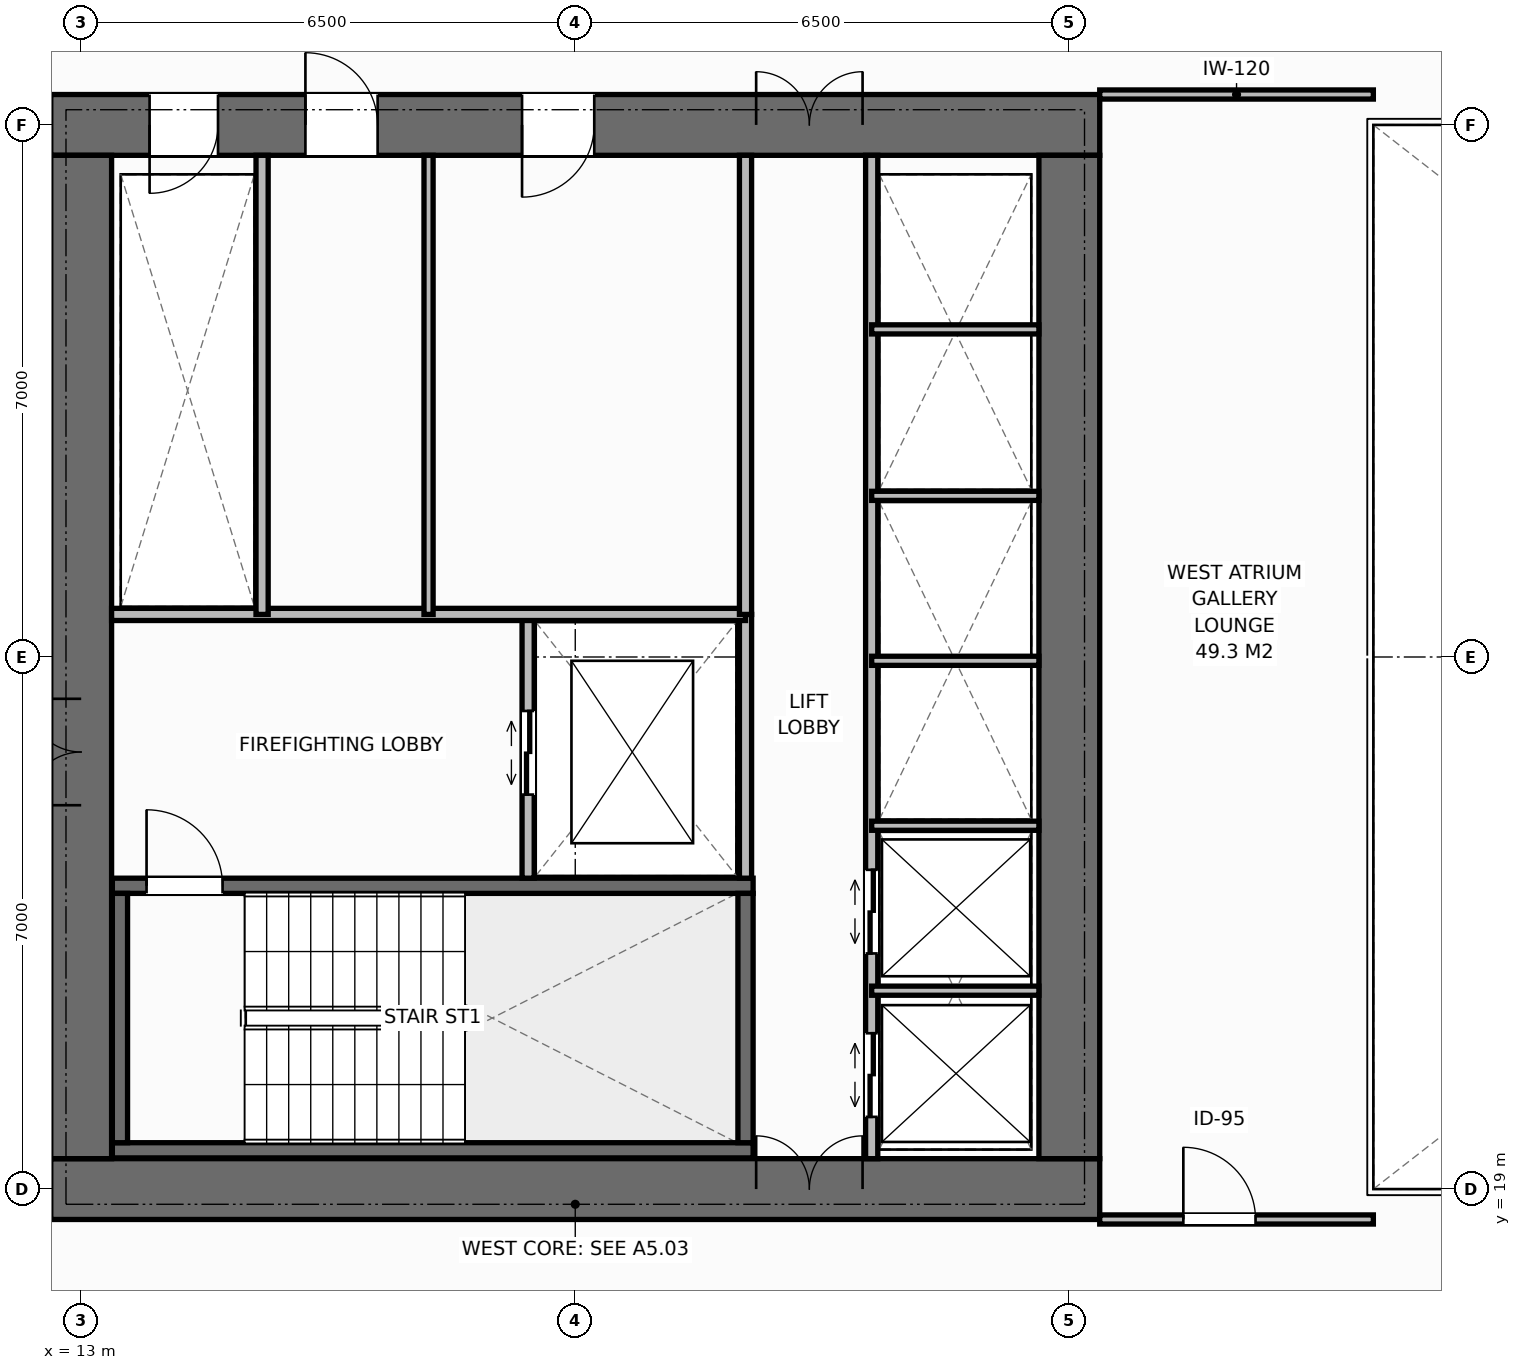
"""IFC4 building model, lengths in metres.
Left out: names, types, materials, properties, quantities, classifications, styles, units other than length and angle.
Written with IfcOpenShell. Run it as: python <this file> out.ifc"""

import sys

from ifc_helpers import new_model, si_unit, direction, frame, frame_2d, origin, place, context, subcontext, project, spatial, rectangle, extrude, element, fill, save


model = new_model("IFC4")
c1 = context("Model", 3, precision=1e-05, world=origin(), true_north=direction((0.0, 1.0)))
c2 = subcontext(c1, "Body", "Model", "MODEL_VIEW")
j1 = project(units=[si_unit("LENGTHUNIT", "METRE"), si_unit("PLANEANGLEUNIT", "RADIAN")], contexts=[c1])
p1 = place(None, origin())
s1 = spatial("IfcSite", under=j1, at=p1, CompositionType="ELEMENT")
p2 = place(p1, origin())
s2 = spatial("IfcBuilding", under=s1, at=p2, CompositionType="ELEMENT")
p3 = place(p2, frame((0.0, 0.0, 27.8)))
s3 = spatial("IfcBuildingStorey", under=s2, at=p3, CompositionType="ELEMENT", Elevation=27.8)
p4 = place(p3, frame((12.6, 19.0, 0.0), z_axis=(0.0, 0.0, 1.0), x_axis=(1.0, 0.0, 0.0)))
e1 = element("IfcWall", 1, at=p4, inside=s3, PredefinedType="SHEAR", context=c2, shape_type="SweptSolid", body=[
    extrude(rectangle(XDim=13.8, YDim=0.8, at=frame_2d((6.9, 0.0))), origin(), (0.0, 0.0, 1.0), 3.8),
])
p5 = place(p4, frame((9.28, 0.0, 0.0)))
e2 = element("IfcOpeningElement", 2, at=p5, cuts=e1, PredefinedType="OPENING", context=c2, shape_type="SweptSolid", body=[
    extrude(rectangle(XDim=1.4, YDim=2.2, at=frame_2d((0.7, 1.1))), frame((0.0, 0.41, 0.0), z_axis=(0.0, -1.0, 0.0), x_axis=(1.0, 0.0, 0.0)), (0.0, 0.0, 1.0), 0.82),
])
p6 = place(p3, frame((12.6, 33.0, 0.0), z_axis=(0.0, 0.0, 1.0), x_axis=(1.0, 0.0, 0.0)))
e3 = element("IfcWall", 3, at=p6, inside=s3, PredefinedType="SHEAR", context=c2, shape_type="SweptSolid", body=[
    extrude(rectangle(XDim=13.8, YDim=0.8, at=frame_2d((6.9, 0.0))), origin(), (0.0, 0.0, 1.0), 3.8),
])
p7 = place(p6, frame((1.3, 0.0, 0.0)))
e4 = element("IfcOpeningElement", 4, at=p7, cuts=e3, PredefinedType="OPENING", context=c2, shape_type="SweptSolid", body=[
    extrude(rectangle(XDim=0.9, YDim=2.15, at=frame_2d((0.45, 1.075))), frame((0.0, 0.41, 0.0), z_axis=(0.0, -1.0, 0.0), x_axis=(1.0, 0.0, 0.0)), (0.0, 0.0, 1.0), 0.82),
])
p8 = place(p6, frame((3.35, 0.0, 0.0)))
e5 = element("IfcOpeningElement", 5, at=p8, cuts=e3, PredefinedType="OPENING", context=c2, shape_type="SweptSolid", body=[
    extrude(rectangle(XDim=0.95, YDim=2.15, at=frame_2d((0.475, 1.075))), frame((0.0, 0.41, 0.0), z_axis=(0.0, -1.0, 0.0), x_axis=(1.0, 0.0, 0.0)), (0.0, 0.0, 1.0), 0.82),
])
p9 = place(p6, frame((6.2, 0.0, 0.0)))
e6 = element("IfcOpeningElement", 6, at=p9, cuts=e3, PredefinedType="OPENING", context=c2, shape_type="SweptSolid", body=[
    extrude(rectangle(XDim=0.95, YDim=2.15, at=frame_2d((0.475, 1.075))), frame((0.0, 0.41, 0.0), z_axis=(0.0, -1.0, 0.0), x_axis=(1.0, 0.0, 0.0)), (0.0, 0.0, 1.0), 0.82),
])
p10 = place(p6, frame((9.28, 0.0, 0.0)))
e7 = element("IfcOpeningElement", 7, at=p10, cuts=e3, PredefinedType="OPENING", context=c2, shape_type="SweptSolid", body=[
    extrude(rectangle(XDim=1.4, YDim=2.2, at=frame_2d((0.7, 1.1))), frame((0.0, 0.41, 0.0), z_axis=(0.0, -1.0, 0.0), x_axis=(1.0, 0.0, 0.0)), (0.0, 0.0, 1.0), 0.82),
])
p11 = place(p3, frame((13.0, 19.4, 0.0), z_axis=(0.0, 0.0, 1.0), x_axis=(0.0, 1.0, 0.0)))
e8 = element("IfcWall", 8, at=p11, inside=s3, PredefinedType="SHEAR", context=c2, shape_type="SweptSolid", body=[
    extrude(rectangle(XDim=13.2, YDim=0.8, at=frame_2d((6.6, 0.0))), origin(), (0.0, 0.0, 1.0), 3.8),
])
p12 = place(p11, frame((4.65, 0.0, 0.0)))
e9 = element("IfcOpeningElement", 9, at=p12, cuts=e8, PredefinedType="OPENING", context=c2, shape_type="SweptSolid", body=[
    extrude(rectangle(XDim=1.4, YDim=2.2, at=frame_2d((0.7, 1.1))), frame((0.0, 0.41, 0.0), z_axis=(0.0, -1.0, 0.0), x_axis=(1.0, 0.0, 0.0)), (0.0, 0.0, 1.0), 0.82),
])
p13 = place(p3, frame((26.0, 19.4, 0.0), z_axis=(0.0, 0.0, 1.0), x_axis=(0.0, 1.0, 0.0)))
e10 = element("IfcWall", 10, at=p13, inside=s3, PredefinedType="SHEAR", context=c2, shape_type="SweptSolid", body=[
    extrude(rectangle(XDim=13.2, YDim=0.8, at=frame_2d((6.6, 0.0))), origin(), (0.0, 0.0, 1.0), 3.8),
])
p14 = place(p3, frame((13.41, 19.51, 0.0), z_axis=(0.0, 0.0, 1.0), x_axis=(1.0, 0.0, 0.0)))
e11 = element("IfcWall", 11, at=p14, inside=s3, PredefinedType="SHEAR", context=c2, shape_type="SweptSolid", body=[
    extrude(rectangle(XDim=8.43, YDim=0.2, at=frame_2d((4.215, 0.0))), origin(), (0.0, 0.0, 1.0), 3.8),
])
p15 = place(p3, frame((13.41, 22.99, 0.0), z_axis=(0.0, 0.0, 1.0), x_axis=(1.0, 0.0, 0.0)))
e12 = element("IfcWall", 12, at=p15, inside=s3, PredefinedType="SHEAR", context=c2, shape_type="SweptSolid", body=[
    extrude(rectangle(XDim=8.43, YDim=0.2, at=frame_2d((4.215, 0.0))), origin(), (0.0, 0.0, 1.0), 3.8),
])
p16 = place(p15, frame((0.45, 0.0, 0.0)))
e13 = element("IfcOpeningElement", 13, at=p16, cuts=e12, PredefinedType="OPENING", context=c2, shape_type="SweptSolid", body=[
    extrude(rectangle(XDim=1.0, YDim=2.15, at=frame_2d((0.5, 1.075))), frame((0.0, 0.11, 0.0), z_axis=(0.0, -1.0, 0.0), x_axis=(1.0, 0.0, 0.0)), (0.0, 0.0, 1.0), 0.22),
])
for number, where, z_axis, x_axis in (
    (14, (13.51, 19.61, 0.0), (0.0, 0.0, 1.0), (0.0, 1.0, 0.0)),
    (15, (21.74, 19.61, 0.0), (0.0, 0.0, 1.0), (0.0, 1.0, 0.0)),
):
    element("IfcWall", number, at=place(p3, frame(where, z_axis=z_axis, x_axis=x_axis)), inside=s3, PredefinedType="SHEAR", context=c2, shape_type="SweptSolid", body=[
        extrude(rectangle(XDim=3.28, YDim=0.2, at=frame_2d((1.64, 0.0))), origin(), (0.0, 0.0, 1.0), 3.8),
    ])
p17 = place(p3, frame((21.74, 23.09, 0.0), z_axis=(0.0, 0.0, 1.0), x_axis=(0.0, 1.0, 0.0)))
e16 = element("IfcWall", 16, at=p17, inside=s3, PredefinedType="STANDARD", context=c2, shape_type="SweptSolid", body=[
    extrude(rectangle(XDim=3.47, YDim=0.16, at=frame_2d((1.735, 0.0))), origin(), (0.0, 0.0, 1.0), 3.55),
])
p18 = place(p3, frame((18.88, 23.09, 0.0), z_axis=(0.0, 0.0, 1.0), x_axis=(0.0, 1.0, 0.0)))
e17 = element("IfcWall", 17, at=p18, inside=s3, PredefinedType="STANDARD", context=c2, shape_type="SweptSolid", body=[
    extrude(rectangle(XDim=3.47, YDim=0.16, at=frame_2d((1.735, 0.0))), origin(), (0.0, 0.0, 1.0), 3.55),
])
p19 = place(p18, frame((1.1, 0.0, 0.0)))
e18 = element("IfcOpeningElement", 18, at=p19, cuts=e17, PredefinedType="OPENING", context=c2, shape_type="SweptSolid", body=[
    extrude(rectangle(XDim=1.1, YDim=2.2, at=frame_2d((0.55, 1.1))), frame((0.0, 0.09, 0.0), z_axis=(0.0, -1.0, 0.0), x_axis=(1.0, 0.0, 0.0)), (0.0, 0.0, 1.0), 0.18),
])
p20 = place(p3, frame((13.4, 26.56, 0.0), z_axis=(0.0, 0.0, 1.0), x_axis=(1.0, 0.0, 0.0)))
e19 = element("IfcWall", 19, at=p20, inside=s3, PredefinedType="STANDARD", context=c2, shape_type="SweptSolid", body=[
    extrude(rectangle(XDim=8.34, YDim=0.16, at=frame_2d((4.17, 0.0))), origin(), (0.0, 0.0, 1.0), 3.55),
])
p21 = place(p3, frame((15.38, 26.56, 0.0), z_axis=(0.0, 0.0, 1.0), x_axis=(0.0, 1.0, 0.0)))
e20 = element("IfcWall", 20, at=p21, inside=s3, PredefinedType="STANDARD", context=c2, shape_type="SweptSolid", body=[
    extrude(rectangle(XDim=6.04, YDim=0.16, at=frame_2d((3.02, 0.0))), origin(), (0.0, 0.0, 1.0), 3.55),
])
p22 = place(p3, frame((17.57, 26.56, 0.0), z_axis=(0.0, 0.0, 1.0), x_axis=(0.0, 1.0, 0.0)))
e21 = element("IfcWall", 21, at=p22, inside=s3, PredefinedType="PARTITIONING", context=c2, shape_type="SweptSolid", body=[
    extrude(rectangle(XDim=6.04, YDim=0.12, at=frame_2d((3.02, 0.0))), origin(), (0.0, 0.0, 1.0), 3.55),
])
p23 = place(p3, frame((21.74, 26.56, 0.0), z_axis=(0.0, 0.0, 1.0), x_axis=(0.0, 1.0, 0.0)))
e22 = element("IfcWall", 22, at=p23, inside=s3, PredefinedType="STANDARD", context=c2, shape_type="SweptSolid", body=[
    extrude(rectangle(XDim=6.04, YDim=0.16, at=frame_2d((3.02, 0.0))), origin(), (0.0, 0.0, 1.0), 3.55),
])
p24 = place(p3, frame((23.4, 19.4, 0.0), z_axis=(0.0, 0.0, 1.0), x_axis=(0.0, 1.0, 0.0)))
e23 = element("IfcWall", 23, at=p24, inside=s3, PredefinedType="STANDARD", context=c2, shape_type="SweptSolid", body=[
    extrude(rectangle(XDim=13.2, YDim=0.16, at=frame_2d((6.6, 0.0))), origin(), (0.0, 0.0, 1.0), 3.55),
])
p25 = place(p24, frame((0.55, 0.0, 0.0)))
e24 = element("IfcOpeningElement", 24, at=p25, cuts=e23, PredefinedType="OPENING", context=c2, shape_type="SweptSolid", body=[
    extrude(rectangle(XDim=1.1, YDim=2.2, at=frame_2d((0.55, 1.1))), frame((0.0, 0.09, 0.0), z_axis=(0.0, -1.0, 0.0), x_axis=(1.0, 0.0, 0.0)), (0.0, 0.0, 1.0), 0.18),
])
p26 = place(p24, frame((2.7, 0.0, 0.0)))
e25 = element("IfcOpeningElement", 25, at=p26, cuts=e23, PredefinedType="OPENING", context=c2, shape_type="SweptSolid", body=[
    extrude(rectangle(XDim=1.1, YDim=2.2, at=frame_2d((0.55, 1.1))), frame((0.0, 0.09, 0.0), z_axis=(0.0, -1.0, 0.0), x_axis=(1.0, 0.0, 0.0)), (0.0, 0.0, 1.0), 0.18),
])
for number, where, z_axis, x_axis in (
    (26, (23.4, 21.61, 0.0), (0.0, 0.0, 1.0), (1.0, 0.0, 0.0)),
    (27, (23.4, 23.78, 0.0), (0.0, 0.0, 1.0), (1.0, 0.0, 0.0)),
    (28, (23.4, 25.95, 0.0), (0.0, 0.0, 1.0), (1.0, 0.0, 0.0)),
    (29, (23.4, 28.12, 0.0), (0.0, 0.0, 1.0), (1.0, 0.0, 0.0)),
    (30, (23.4, 30.31, 0.0), (0.0, 0.0, 1.0), (1.0, 0.0, 0.0)),
):
    element("IfcWall", number, at=place(p3, frame(where, z_axis=z_axis, x_axis=x_axis)), inside=s3, PredefinedType="PARTITIONING", context=c2, shape_type="SweptSolid", body=[
        extrude(rectangle(XDim=2.2, YDim=0.12, at=frame_2d((1.1, 0.0))), origin(), (0.0, 0.0, 1.0), 3.55),
    ])
p27 = place(p3, frame((26.4, 33.4, 0.0), z_axis=(0.0, 0.0, 1.0), x_axis=(1.0, 0.0, 0.0)))
e31 = element("IfcWall", 31, at=p27, inside=s3, PredefinedType="PARTITIONING", context=c2, shape_type="SweptSolid", body=[
    extrude(rectangle(XDim=3.6, YDim=0.12, at=frame_2d((1.8, 0.0))), origin(), (0.0, 0.0, 1.0), 3.55),
])
p28 = place(p3, frame((26.4, 18.6, 0.0), z_axis=(0.0, 0.0, 1.0), x_axis=(1.0, 0.0, 0.0)))
e32 = element("IfcWall", 32, at=p28, inside=s3, PredefinedType="PARTITIONING", context=c2, shape_type="SweptSolid", body=[
    extrude(rectangle(XDim=3.6, YDim=0.12, at=frame_2d((1.8, 0.0))), origin(), (0.0, 0.0, 1.0), 3.55),
])
p29 = place(p28, frame((1.1, 0.0, 0.0)))
e33 = element("IfcOpeningElement", 33, at=p29, cuts=e32, PredefinedType="OPENING", context=c2, shape_type="SweptSolid", body=[
    extrude(rectangle(XDim=0.95, YDim=2.15, at=frame_2d((0.475, 1.075))), frame((0.0, 0.07, 0.0), z_axis=(0.0, -1.0, 0.0), x_axis=(1.0, 0.0, 0.0)), (0.0, 0.0, 1.0), 0.14),
])
p30 = place(p16, origin())
e34 = element("IfcDoor", 34, at=p30, inside=s3, OperationType="SINGLE_SWING_LEFT", PredefinedType="DOOR", context=c2, shape_type="SweptSolid", body=[
    extrude(rectangle(XDim=1.0, YDim=2.15, at=frame_2d((0.5, 1.075))), frame((0.0, 0.025, 0.0), z_axis=(0.0, -1.0, 0.0), x_axis=(1.0, 0.0, 0.0)), (0.0, 0.0, 1.0), 0.05),
])
fill(e13, e34)
p31 = place(p12, origin())
e35 = element("IfcDoor", 35, at=p31, inside=s3, OperationType="DOUBLE_DOOR_SINGLE_SWING", PredefinedType="DOOR", context=c2, shape_type="SweptSolid", body=[
    extrude(rectangle(XDim=1.4, YDim=2.2, at=frame_2d((0.7, 1.1))), frame((0.0, 0.025, 0.0), z_axis=(0.0, -1.0, 0.0), x_axis=(1.0, 0.0, 0.0)), (0.0, 0.0, 1.0), 0.05),
])
fill(e9, e35)
p32 = place(p19, origin())
e36 = element("IfcDoor", 36, at=p32, inside=s3, OperationType="DOUBLE_DOOR_SLIDING", PredefinedType="DOOR", context=c2, shape_type="SweptSolid", body=[
    extrude(rectangle(XDim=1.1, YDim=2.2, at=frame_2d((0.55, 1.1))), frame((0.0, 0.025, 0.0), z_axis=(0.0, -1.0, 0.0), x_axis=(1.0, 0.0, 0.0)), (0.0, 0.0, 1.0), 0.05),
])
fill(e18, e36)
p33 = place(p7, origin())
e37 = element("IfcDoor", 37, at=p33, inside=s3, OperationType="SINGLE_SWING_RIGHT", PredefinedType="DOOR", context=c2, shape_type="SweptSolid", body=[
    extrude(rectangle(XDim=0.9, YDim=2.15, at=frame_2d((0.45, 1.075))), frame((0.0, -0.075, 0.0), z_axis=(0.0, -1.0, 0.0), x_axis=(1.0, 0.0, 0.0)), (0.0, 0.0, 1.0), 0.05),
])
fill(e4, e37)
p34 = place(p8, origin())
e38 = element("IfcDoor", 38, at=p34, inside=s3, OperationType="SINGLE_SWING_LEFT", PredefinedType="DOOR", context=c2, shape_type="SweptSolid", body=[
    extrude(rectangle(XDim=0.95, YDim=2.15, at=frame_2d((0.475, 1.075))), frame((0.0, -0.075, 0.0), z_axis=(0.0, -1.0, 0.0), x_axis=(1.0, 0.0, 0.0)), (0.0, 0.0, 1.0), 0.05),
])
fill(e5, e38)
p35 = place(p9, origin())
e39 = element("IfcDoor", 39, at=p35, inside=s3, OperationType="SINGLE_SWING_RIGHT", PredefinedType="DOOR", context=c2, shape_type="SweptSolid", body=[
    extrude(rectangle(XDim=0.95, YDim=2.15, at=frame_2d((0.475, 1.075))), frame((0.0, -0.075, 0.0), z_axis=(0.0, -1.0, 0.0), x_axis=(1.0, 0.0, 0.0)), (0.0, 0.0, 1.0), 0.05),
])
fill(e6, e39)
p36 = place(p5, origin())
e40 = element("IfcDoor", 40, at=p36, inside=s3, OperationType="DOUBLE_DOOR_SINGLE_SWING", PredefinedType="DOOR", context=c2, shape_type="SweptSolid", body=[
    extrude(rectangle(XDim=1.4, YDim=2.2, at=frame_2d((0.7, 1.1))), frame((0.0, 0.125, 0.0), z_axis=(0.0, -1.0, 0.0), x_axis=(1.0, 0.0, 0.0)), (0.0, 0.0, 1.0), 0.05),
])
fill(e2, e40)
p37 = place(p10, origin())
e41 = element("IfcDoor", 41, at=p37, inside=s3, OperationType="DOUBLE_DOOR_SINGLE_SWING", PredefinedType="DOOR", context=c2, shape_type="SweptSolid", body=[
    extrude(rectangle(XDim=1.4, YDim=2.2, at=frame_2d((0.7, 1.1))), frame((0.0, -0.075, 0.0), z_axis=(0.0, -1.0, 0.0), x_axis=(1.0, 0.0, 0.0)), (0.0, 0.0, 1.0), 0.05),
])
fill(e7, e41)
p38 = place(p25, origin())
e42 = element("IfcDoor", 42, at=p38, inside=s3, OperationType="DOUBLE_DOOR_SLIDING", PredefinedType="DOOR", context=c2, shape_type="SweptSolid", body=[
    extrude(rectangle(XDim=1.1, YDim=2.2, at=frame_2d((0.55, 1.1))), frame((0.0, 0.025, 0.0), z_axis=(0.0, -1.0, 0.0), x_axis=(1.0, 0.0, 0.0)), (0.0, 0.0, 1.0), 0.05),
])
fill(e24, e42)
p39 = place(p26, origin())
e43 = element("IfcDoor", 43, at=p39, inside=s3, OperationType="DOUBLE_DOOR_SLIDING", PredefinedType="DOOR", context=c2, shape_type="SweptSolid", body=[
    extrude(rectangle(XDim=1.1, YDim=2.2, at=frame_2d((0.55, 1.1))), frame((0.0, 0.025, 0.0), z_axis=(0.0, -1.0, 0.0), x_axis=(1.0, 0.0, 0.0)), (0.0, 0.0, 1.0), 0.05),
])
fill(e25, e43)
p40 = place(p29, origin())
e44 = element("IfcDoor", 44, at=p40, inside=s3, OperationType="SINGLE_SWING_LEFT", PredefinedType="DOOR", context=c2, shape_type="SweptSolid", body=[
    extrude(rectangle(XDim=0.95, YDim=2.15, at=frame_2d((0.475, 1.075))), frame((0.0, 0.025, 0.0), z_axis=(0.0, -1.0, 0.0), x_axis=(1.0, 0.0, 0.0)), (0.0, 0.0, 1.0), 0.05),
])
fill(e33, e44)
save(model, sys.argv[1])
